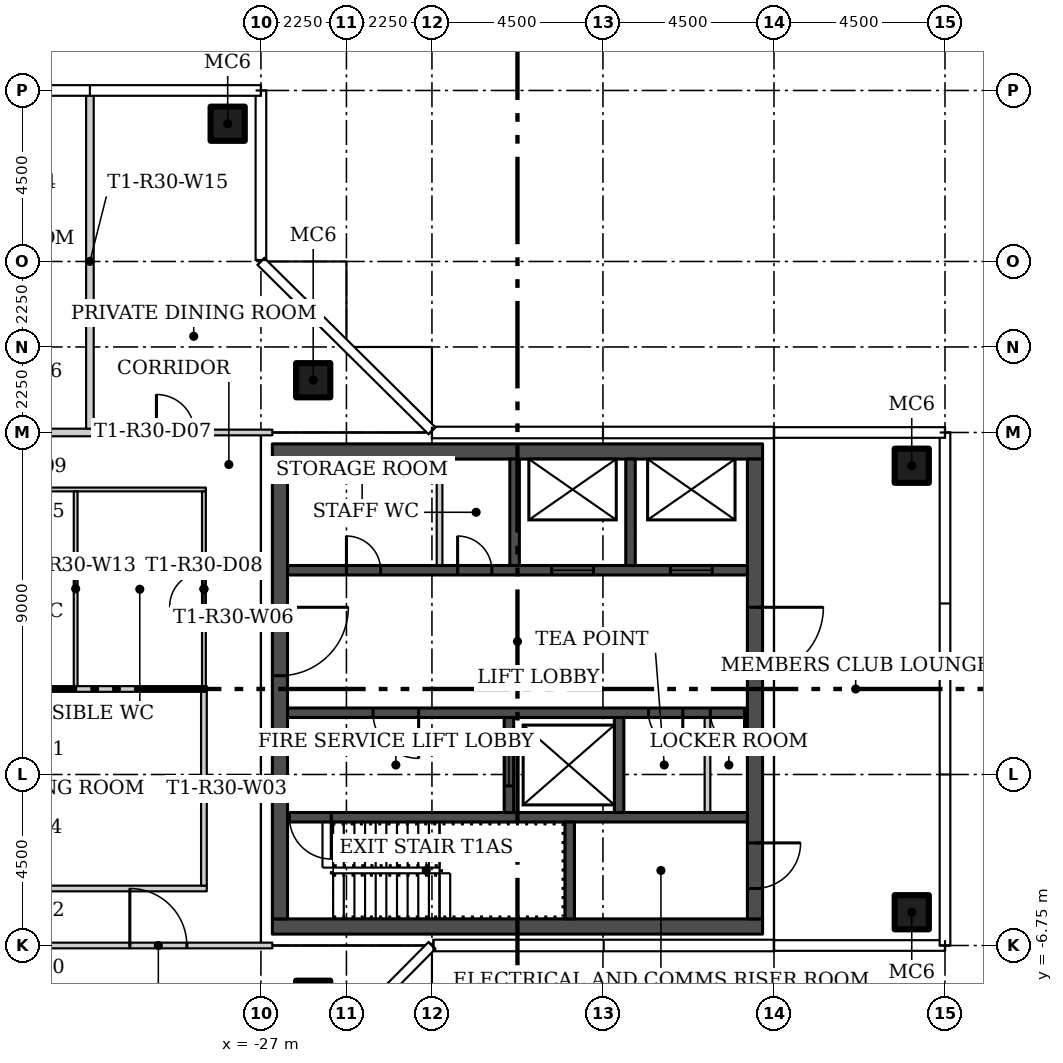
"""IFC4 building model, lengths in metres.
Left out: names, types, materials, properties, quantities, classifications, styles, units other than length and angle.
Written with IfcOpenShell. Run it as: python <this file> out.ifc"""

import sys

from ifc_helpers import new_model, si_unit, direction, frame, frame_2d, origin, origin_2d, place, context, subcontext, project, spatial, rectangle, hollow_rectangle, extrude, element, fill, save


model = new_model("IFC4")
c1 = context("Model", 3, precision=1e-05, world=origin(), true_north=direction((0.0, 1.0)))
c2 = subcontext(c1, "Body", "Model", "MODEL_VIEW")
j1 = project(units=[si_unit("LENGTHUNIT", "METRE"), si_unit("PLANEANGLEUNIT", "RADIAN")], contexts=[c1])
p1 = place(None, origin())
s1 = spatial("IfcSite", under=j1, at=p1, CompositionType="ELEMENT")
p2 = place(p1, origin())
s2 = spatial("IfcBuilding", under=s1, at=p2, CompositionType="ELEMENT")
p3 = place(p2, frame((0.0, 0.0, 269.4)))
s3 = spatial("IfcBuildingStorey", under=s2, at=p3, CompositionType="ELEMENT", Elevation=269.4)
for number, where in (
    (1, (-25.625, 8.125, 0.0)),
    (2, (-25.625, -8.125, 0.0)),
    (3, (-9.875, -5.875, 0.0)),
    (4, (-9.875, 5.875, 0.0)),
    (5, (-27.875, 14.875, 0.0)),
):
    element("IfcColumn", number, at=place(p3, frame(where)), inside=s3, PredefinedType="COLUMN", context=c2, shape_type="SweptSolid", body=[
        extrude(hollow_rectangle(XDim=0.9, YDim=0.9, WallThickness=0.036, at=origin_2d()), origin(), (0.0, 0.0, 1.0), 3.45),
    ])
p4 = place(p3, frame((-39.075, -5.25, 0.0)))
e6 = element("IfcWall", 6, at=p4, inside=s3, PredefinedType="PARTITIONING", context=c2, shape_type="SweptSolid", body=[
    extrude(rectangle(XDim=10.65, YDim=0.15, at=frame_2d((5.325, 0.0))), origin(), (0.0, 0.0, 1.0), 3.45),
])
p5 = place(p4, frame((4.575, 0.0, 0.0)))
e7 = element("IfcOpeningElement", 7, at=p5, cuts=e6, PredefinedType="OPENING", context=c2, shape_type="SweptSolid", body=[
    extrude(rectangle(XDim=1.5, YDim=2.1, at=frame_2d((0.75, 1.05))), frame((0.0, 0.085, 0.0), z_axis=(0.0, -1.0, 0.0), x_axis=(1.0, 0.0, 0.0)), (0.0, 0.0, 1.0), 0.17),
])
p6 = place(p3, frame((-28.5, -5.175, 0.0), z_axis=(0.0, 0.0, 1.0), x_axis=(0.0, 1.0, 0.0)))
e8 = element("IfcWall", 8, at=p6, inside=s3, PredefinedType="PARTITIONING", context=c2, shape_type="SweptSolid", body=[
    extrude(rectangle(XDim=5.1, YDim=0.15, at=frame_2d((2.55, 0.0))), origin(), (0.0, 0.0, 1.0), 3.45),
])
p7 = place(p3, frame((-28.45, 5.25, 0.0), z_axis=(0.0, 0.0, 1.0), x_axis=(-1.0, 0.0, 0.0)))
e9 = element("IfcWall", 9, at=p7, inside=s3, PredefinedType="PARTITIONING", context=c2, shape_type="SweptSolid", body=[
    extrude(rectangle(XDim=10.6, YDim=0.1, at=frame_2d((5.3, 0.0))), origin(), (0.0, 0.0, 1.0), 3.45),
])
p8 = place(p7, frame((4.756, 0.0, 0.0)))
e10 = element("IfcOpeningElement", 10, at=p8, cuts=e9, PredefinedType="OPENING", context=c2, shape_type="SweptSolid", body=[
    extrude(rectangle(XDim=0.9, YDim=2.1, at=frame_2d((0.45, 1.05))), frame((0.0, 0.06, 0.0), z_axis=(0.0, -1.0, 0.0), x_axis=(1.0, 0.0, 0.0)), (0.0, 0.0, 1.0), 0.12),
])
p9 = place(p3, frame((-28.5, 0.075, 0.0), z_axis=(0.0, 0.0, 1.0), x_axis=(0.0, 1.0, 0.0)))
e11 = element("IfcWall", 11, at=p9, inside=s3, PredefinedType="PARTITIONING", context=c2, shape_type="SweptSolid", body=[
    extrude(rectangle(XDim=5.125, YDim=0.1, at=frame_2d((2.562, 0.0))), origin(), (0.0, 0.0, 1.0), 3.45),
])
p10 = place(p9, frame((2.1, 0.0, 0.0)))
e12 = element("IfcOpeningElement", 12, at=p10, cuts=e11, PredefinedType="OPENING", context=c2, shape_type="SweptSolid", body=[
    extrude(rectangle(XDim=0.9, YDim=2.1, at=frame_2d((0.45, 1.05))), frame((0.0, 0.06, 0.0), z_axis=(0.0, -1.0, 0.0), x_axis=(1.0, 0.0, 0.0)), (0.0, 0.0, 1.0), 0.12),
])
p11 = place(p3, frame((-31.6, 6.75, 0.0)))
e13 = element("IfcWall", 13, at=p11, inside=s3, PredefinedType="PARTITIONING", context=c2, shape_type="SweptSolid", body=[
    extrude(rectangle(XDim=4.9, YDim=0.15, at=frame_2d((2.45, 0.0))), origin(), (0.0, 0.0, 1.0), 3.45),
])
p12 = place(p11, frame((1.85, 0.0, 0.0)))
e14 = element("IfcOpeningElement", 14, at=p12, cuts=e13, PredefinedType="OPENING", context=c2, shape_type="SweptSolid", body=[
    extrude(rectangle(XDim=1.0, YDim=2.4, at=frame_2d((0.5, 1.2))), frame((0.0, 0.085, 0.0), z_axis=(0.0, -1.0, 0.0), x_axis=(1.0, 0.0, 0.0)), (0.0, 0.0, 1.0), 0.17),
])
p13 = place(p3, frame((-36.1, 6.75, 0.0)))
e15 = element("IfcWall", 15, at=p13, inside=s3, PredefinedType="PARTITIONING", context=c2, shape_type="SweptSolid", body=[
    extrude(rectangle(XDim=4.7, YDim=0.2, at=frame_2d((2.35, 0.0))), origin(), (0.0, 0.0, 1.0), 3.45),
])
p14 = place(p13, frame((1.6, 0.0, 0.0)))
e16 = element("IfcOpeningElement", 16, at=p14, cuts=e15, PredefinedType="OPENING", context=c2, shape_type="SweptSolid", body=[
    extrude(rectangle(XDim=1.5, YDim=2.4, at=frame_2d((0.75, 1.2))), frame((0.0, 0.11, 0.0), z_axis=(0.0, -1.0, 0.0), x_axis=(1.0, 0.0, 0.0)), (0.0, 0.0, 1.0), 0.22),
])
p15 = place(p3, frame((-40.8, -6.75, 0.0)))
e17 = element("IfcWall", 17, at=p15, inside=s3, PredefinedType="PARTITIONING", context=c2, shape_type="SweptSolid", body=[
    extrude(rectangle(XDim=14.1, YDim=0.15, at=frame_2d((7.05, 0.0))), origin(), (0.0, 0.0, 1.0), 3.45),
])
p16 = place(p15, frame((2.25, 0.0, 0.0)))
e18 = element("IfcOpeningElement", 18, at=p16, cuts=e17, PredefinedType="OPENING", context=c2, shape_type="SweptSolid", body=[
    extrude(rectangle(XDim=1.5, YDim=2.1, at=frame_2d((0.75, 1.05))), frame((0.0, 0.085, 0.0), z_axis=(0.0, -1.0, 0.0), x_axis=(1.0, 0.0, 0.0)), (0.0, 0.0, 1.0), 0.17),
])
p17 = place(p15, frame((10.35, 0.0, 0.0)))
e19 = element("IfcOpeningElement", 19, at=p17, cuts=e17, PredefinedType="OPENING", context=c2, shape_type="SweptSolid", body=[
    extrude(rectangle(XDim=1.5, YDim=2.1, at=frame_2d((0.75, 1.05))), frame((0.0, 0.085, 0.0), z_axis=(0.0, -1.0, 0.0), x_axis=(1.0, 0.0, 0.0)), (0.0, 0.0, 1.0), 0.17),
])
p18 = place(p3, frame((-28.425, 0.0, 0.0), z_axis=(0.0, 0.0, 1.0), x_axis=(-1.0, 0.0, 0.0)))
e20 = element("IfcWall", 20, at=p18, inside=s3, PredefinedType="PARTITIONING", context=c2, shape_type="SweptSolid", body=[
    extrude(rectangle(XDim=10.65, YDim=0.15, at=frame_2d((5.325, 0.0))), origin(), (0.0, 0.0, 1.0), 3.45),
])
p19 = place(p3, frame((-31.875, 0.075, 0.0), z_axis=(0.0, 0.0, 1.0), x_axis=(0.0, 1.0, 0.0)))
e21 = element("IfcWall", 21, at=p19, inside=s3, PredefinedType="PARTITIONING", context=c2, shape_type="SweptSolid", body=[
    extrude(rectangle(XDim=5.125, YDim=0.1, at=frame_2d((2.562, 0.0))), origin(), (0.0, 0.0, 1.0), 3.45),
])
p20 = place(p3, frame((-31.5, 6.85, 0.0), z_axis=(0.0, 0.0, 1.0), x_axis=(0.0, 1.0, 0.0)))
e22 = element("IfcWall", 22, at=p20, inside=s3, PredefinedType="PARTITIONING", context=c2, shape_type="SweptSolid", body=[
    extrude(rectangle(XDim=8.805, YDim=0.2, at=frame_2d((4.402, 0.0))), origin(), (0.0, 0.0, 1.0), 3.45),
])
for number, where in (
    (23, (-26.7, -6.25, 0.0)),
    (24, (-26.7, 6.25, 0.0)),
):
    element("IfcWall", number, at=place(p3, frame(where)), inside=s3, PredefinedType="SHEAR", context=c2, shape_type="SweptSolid", body=[
        extrude(rectangle(XDim=12.9, YDim=0.4, at=frame_2d((6.45, 0.0))), origin(), (0.0, 0.0, 1.0), 3.45),
    ])
p21 = place(p3, frame((-26.5, 6.05, 0.0), z_axis=(0.0, 0.0, 1.0), x_axis=(0.0, -1.0, 0.0)))
e25 = element("IfcWall", 25, at=p21, inside=s3, PredefinedType="SHEAR", context=c2, shape_type="SweptSolid", body=[
    extrude(rectangle(XDim=12.1, YDim=0.4, at=frame_2d((6.05, 0.0))), origin(), (0.0, 0.0, 1.0), 3.45),
])
p22 = place(p21, frame((3.9, 0.0, 0.0)))
e26 = element("IfcOpeningElement", 26, at=p22, cuts=e25, PredefinedType="OPENING", context=c2, shape_type="SweptSolid", body=[
    extrude(rectangle(XDim=1.8, YDim=2.4, at=frame_2d((0.9, 1.2))), frame((0.0, 0.21, 0.0), z_axis=(0.0, -1.0, 0.0), x_axis=(1.0, 0.0, 0.0)), (0.0, 0.0, 1.0), 0.42),
])
p23 = place(p3, frame((-14.0, 6.05, 0.0), z_axis=(0.0, 0.0, 1.0), x_axis=(0.0, -1.0, 0.0)))
e27 = element("IfcWall", 27, at=p23, inside=s3, PredefinedType="SHEAR", context=c2, shape_type="SweptSolid", body=[
    extrude(rectangle(XDim=12.1, YDim=0.4, at=frame_2d((6.05, 0.0))), origin(), (0.0, 0.0, 1.0), 3.45),
])
p24 = place(p23, frame((10.1, 0.0, 0.0)))
e28 = element("IfcOpeningElement", 28, at=p24, cuts=e27, PredefinedType="OPENING", context=c2, shape_type="SweptSolid", body=[
    extrude(rectangle(XDim=1.2, YDim=2.1, at=frame_2d((0.6, 1.05))), frame((0.0, 0.21, 0.0), z_axis=(0.0, -1.0, 0.0), x_axis=(1.0, 0.0, 0.0)), (0.0, 0.0, 1.0), 0.42),
])
p25 = place(p23, frame((3.9, 0.0, 0.0)))
e29 = element("IfcOpeningElement", 29, at=p25, cuts=e27, PredefinedType="OPENING", context=c2, shape_type="SweptSolid", body=[
    extrude(rectangle(XDim=1.8, YDim=2.4, at=frame_2d((0.9, 1.2))), frame((0.0, 0.21, 0.0), z_axis=(0.0, -1.0, 0.0), x_axis=(1.0, 0.0, 0.0)), (0.0, 0.0, 1.0), 0.42),
])
p26 = place(p3, frame((-14.2, -3.375, 0.0), z_axis=(0.0, 0.0, 1.0), x_axis=(-1.0, 0.0, 0.0)))
e30 = element("IfcWall", 30, at=p26, inside=s3, PredefinedType="SHEAR", context=c2, shape_type="SweptSolid", body=[
    extrude(rectangle(XDim=12.1, YDim=0.25, at=frame_2d((6.05, 0.0))), origin(), (0.0, 0.0, 1.0), 3.45),
])
p27 = place(p26, frame((10.95, 0.0, 0.0)))
e31 = element("IfcOpeningElement", 31, at=p27, cuts=e30, PredefinedType="OPENING", context=c2, shape_type="SweptSolid", body=[
    extrude(rectangle(XDim=1.1, YDim=2.1, at=frame_2d((0.55, 1.05))), frame((0.0, 0.135, 0.0), z_axis=(0.0, -1.0, 0.0), x_axis=(1.0, 0.0, 0.0)), (0.0, 0.0, 1.0), 0.27),
])
p28 = place(p3, frame((-18.875, -6.05, 0.0), z_axis=(0.0, 0.0, 1.0), x_axis=(0.0, 1.0, 0.0)))
e32 = element("IfcWall", 32, at=p28, inside=s3, PredefinedType="SHEAR", context=c2, shape_type="SweptSolid", body=[
    extrude(rectangle(XDim=2.55, YDim=0.25, at=frame_2d((1.275, 0.0))), origin(), (0.0, 0.0, 1.0), 3.45),
])
p29 = place(p3, frame((-14.2, -0.625, 0.0), z_axis=(0.0, 0.0, 1.0), x_axis=(-1.0, 0.0, 0.0)))
e33 = element("IfcWall", 33, at=p29, inside=s3, PredefinedType="SHEAR", context=c2, shape_type="SweptSolid", body=[
    extrude(rectangle(XDim=12.1, YDim=0.25, at=frame_2d((6.05, 0.0))), origin(), (0.0, 0.0, 1.0), 3.45),
])
p30 = place(p29, frame((8.65, 0.0, 0.0)))
e34 = element("IfcOpeningElement", 34, at=p30, cuts=e33, PredefinedType="OPENING", context=c2, shape_type="SweptSolid", body=[
    extrude(rectangle(XDim=1.2, YDim=2.1, at=frame_2d((0.6, 1.05))), frame((0.0, 0.135, 0.0), z_axis=(0.0, -1.0, 0.0), x_axis=(1.0, 0.0, 0.0)), (0.0, 0.0, 1.0), 0.27),
])
p31 = place(p29, frame((1.7, 0.0, 0.0)))
e35 = element("IfcOpeningElement", 35, at=p31, cuts=e33, PredefinedType="OPENING", context=c2, shape_type="SweptSolid", body=[
    extrude(rectangle(XDim=0.9, YDim=2.1, at=frame_2d((0.45, 1.05))), frame((0.0, 0.135, 0.0), z_axis=(0.0, -1.0, 0.0), x_axis=(1.0, 0.0, 0.0)), (0.0, 0.0, 1.0), 0.27),
])
p32 = place(p29, frame((0.075, 0.0, 0.0)))
e36 = element("IfcOpeningElement", 36, at=p32, cuts=e33, PredefinedType="OPENING", context=c2, shape_type="SweptSolid", body=[
    extrude(rectangle(XDim=0.9, YDim=2.1, at=frame_2d((0.45, 1.05))), frame((0.0, 0.135, 0.0), z_axis=(0.0, -1.0, 0.0), x_axis=(1.0, 0.0, 0.0)), (0.0, 0.0, 1.0), 0.27),
])
p33 = place(p3, frame((-20.475, -3.25, 0.0), z_axis=(0.0, 0.0, 1.0), x_axis=(0.0, 1.0, 0.0)))
e37 = element("IfcWall", 37, at=p33, inside=s3, PredefinedType="SHEAR", context=c2, shape_type="SweptSolid", body=[
    extrude(rectangle(XDim=2.5, YDim=0.25, at=frame_2d((1.25, 0.0))), origin(), (0.0, 0.0, 1.0), 3.45),
])
p34 = place(p33, frame((0.7, 0.0, 0.0)))
e38 = element("IfcOpeningElement", 38, at=p34, cuts=e37, PredefinedType="OPENING", context=c2, shape_type="SweptSolid", body=[
    extrude(rectangle(XDim=1.1, YDim=2.1, at=frame_2d((0.55, 1.05))), frame((0.0, 0.135, 0.0), z_axis=(0.0, -1.0, 0.0), x_axis=(1.0, 0.0, 0.0)), (0.0, 0.0, 1.0), 0.27),
])
p35 = place(p3, frame((-17.575, -3.25, 0.0), z_axis=(0.0, 0.0, 1.0), x_axis=(0.0, 1.0, 0.0)))
e39 = element("IfcWall", 39, at=p35, inside=s3, PredefinedType="SHEAR", context=c2, shape_type="SweptSolid", body=[
    extrude(rectangle(XDim=2.5, YDim=0.25, at=frame_2d((1.25, 0.0))), origin(), (0.0, 0.0, 1.0), 3.45),
])
p36 = place(p3, frame((-15.25, -3.25, 0.0), z_axis=(0.0, 0.0, 1.0), x_axis=(0.0, 1.0, 0.0)))
e40 = element("IfcWall", 40, at=p36, inside=s3, PredefinedType="PARTITIONING", context=c2, shape_type="SweptSolid", body=[
    extrude(rectangle(XDim=2.5, YDim=0.15, at=frame_2d((1.25, 0.0))), origin(), (0.0, 0.0, 1.0), 3.45),
])
p37 = place(p3, frame((-26.3, 3.125, 0.0)))
e41 = element("IfcWall", 41, at=p37, inside=s3, PredefinedType="SHEAR", context=c2, shape_type="SweptSolid", body=[
    extrude(rectangle(XDim=12.1, YDim=0.25, at=frame_2d((6.05, 0.0))), origin(), (0.0, 0.0, 1.0), 3.45),
])
p38 = place(p37, frame((6.95, 0.0, 0.0)))
e42 = element("IfcOpeningElement", 42, at=p38, cuts=e41, PredefinedType="OPENING", context=c2, shape_type="SweptSolid", body=[
    extrude(rectangle(XDim=1.1, YDim=2.1, at=frame_2d((0.55, 1.05))), frame((0.0, 0.135, 0.0), z_axis=(0.0, -1.0, 0.0), x_axis=(1.0, 0.0, 0.0)), (0.0, 0.0, 1.0), 0.27),
])
p39 = place(p37, frame((10.075, 0.0, 0.0)))
e43 = element("IfcOpeningElement", 43, at=p39, cuts=e41, PredefinedType="OPENING", context=c2, shape_type="SweptSolid", body=[
    extrude(rectangle(XDim=1.1, YDim=2.1, at=frame_2d((0.55, 1.05))), frame((0.0, 0.135, 0.0), z_axis=(0.0, -1.0, 0.0), x_axis=(1.0, 0.0, 0.0)), (0.0, 0.0, 1.0), 0.27),
])
p40 = place(p37, frame((1.55, 0.0, 0.0)))
e44 = element("IfcOpeningElement", 44, at=p40, cuts=e41, PredefinedType="OPENING", context=c2, shape_type="SweptSolid", body=[
    extrude(rectangle(XDim=0.9, YDim=2.1, at=frame_2d((0.45, 1.05))), frame((0.0, 0.135, 0.0), z_axis=(0.0, -1.0, 0.0), x_axis=(1.0, 0.0, 0.0)), (0.0, 0.0, 1.0), 0.27),
])
p41 = place(p37, frame((4.475, 0.0, 0.0)))
e45 = element("IfcOpeningElement", 45, at=p41, cuts=e41, PredefinedType="OPENING", context=c2, shape_type="SweptSolid", body=[
    extrude(rectangle(XDim=0.9, YDim=2.1, at=frame_2d((0.45, 1.05))), frame((0.0, 0.135, 0.0), z_axis=(0.0, -1.0, 0.0), x_axis=(1.0, 0.0, 0.0)), (0.0, 0.0, 1.0), 0.27),
])
for number, where, z_axis, x_axis in (
    (46, (-20.325, 3.25, 0.0), (0.0, 0.0, 1.0), (0.0, 1.0, 0.0)),
    (47, (-17.275, 3.25, 0.0), (0.0, 0.0, 1.0), (0.0, 1.0, 0.0)),
):
    element("IfcWall", number, at=place(p3, frame(where, z_axis=z_axis, x_axis=x_axis)), inside=s3, PredefinedType="SHEAR", context=c2, shape_type="SweptSolid", body=[
        extrude(rectangle(XDim=2.8, YDim=0.25, at=frame_2d((1.4, 0.0))), origin(), (0.0, 0.0, 1.0), 3.45),
    ])
p42 = place(p3, frame((-22.3, 3.25, 0.0), z_axis=(0.0, 0.0, 1.0), x_axis=(0.0, 1.0, 0.0)))
e48 = element("IfcWall", 48, at=p42, inside=s3, PredefinedType="PARTITIONING", context=c2, shape_type="SweptSolid", body=[
    extrude(rectangle(XDim=2.8, YDim=0.15, at=frame_2d((1.4, 0.0))), origin(), (0.0, 0.0, 1.0), 3.45),
])
p43 = place(p17, origin())
e49 = element("IfcDoor", 49, at=p43, inside=s3, OperationType="DOUBLE_DOOR_SINGLE_SWING", PredefinedType="DOOR", context=c2, shape_type="SweptSolid", body=[
    extrude(rectangle(XDim=1.5, YDim=2.1, at=frame_2d((0.75, 1.05))), frame((0.0, 0.025, 0.0), z_axis=(0.0, -1.0, 0.0), x_axis=(1.0, 0.0, 0.0)), (0.0, 0.0, 1.0), 0.05),
])
fill(e19, e49)
p44 = place(p12, origin())
e50 = element("IfcDoor", 50, at=p44, inside=s3, OperationType="SINGLE_SWING_RIGHT", PredefinedType="DOOR", context=c2, shape_type="SweptSolid", body=[
    extrude(rectangle(XDim=1.0, YDim=2.4, at=frame_2d((0.5, 1.2))), frame((0.0, 0.025, 0.0), z_axis=(0.0, -1.0, 0.0), x_axis=(1.0, 0.0, 0.0)), (0.0, 0.0, 1.0), 0.05),
])
fill(e14, e50)
p45 = place(p10, origin())
e51 = element("IfcDoor", 51, at=p45, inside=s3, OperationType="SINGLE_SWING_RIGHT", PredefinedType="DOOR", context=c2, shape_type="SweptSolid", body=[
    extrude(rectangle(XDim=0.9, YDim=2.1, at=frame_2d((0.45, 1.05))), frame((0.0, 0.025, 0.0), z_axis=(0.0, -1.0, 0.0), x_axis=(1.0, 0.0, 0.0)), (0.0, 0.0, 1.0), 0.05),
])
fill(e12, e51)
p46 = place(p22, origin())
e52 = element("IfcDoor", 52, at=p46, inside=s3, OperationType="DOUBLE_DOOR_SINGLE_SWING", PredefinedType="DOOR", context=c2, shape_type="SweptSolid", body=[
    extrude(rectangle(XDim=1.8, YDim=2.4, at=frame_2d((0.9, 1.2))), frame((0.0, 0.025, 0.0), z_axis=(0.0, -1.0, 0.0), x_axis=(1.0, 0.0, 0.0)), (0.0, 0.0, 1.0), 0.05),
])
fill(e26, e52)
p47 = place(p24, origin())
e53 = element("IfcDoor", 53, at=p47, inside=s3, OperationType="SINGLE_SWING_RIGHT", PredefinedType="DOOR", context=c2, shape_type="SweptSolid", body=[
    extrude(rectangle(XDim=1.2, YDim=2.1, at=frame_2d((0.6, 1.05))), frame((0.0, 0.025, 0.0), z_axis=(0.0, -1.0, 0.0), x_axis=(1.0, 0.0, 0.0)), (0.0, 0.0, 1.0), 0.05),
])
fill(e28, e53)
p48 = place(p25, origin())
e54 = element("IfcDoor", 54, at=p48, inside=s3, OperationType="DOUBLE_DOOR_SINGLE_SWING", PredefinedType="DOOR", context=c2, shape_type="SweptSolid", body=[
    extrude(rectangle(XDim=1.8, YDim=2.4, at=frame_2d((0.9, 1.2))), frame((0.0, 0.025, 0.0), z_axis=(0.0, -1.0, 0.0), x_axis=(1.0, 0.0, 0.0)), (0.0, 0.0, 1.0), 0.05),
])
fill(e29, e54)
p49 = place(p27, origin())
e55 = element("IfcDoor", 55, at=p49, inside=s3, OperationType="SINGLE_SWING_RIGHT", PredefinedType="DOOR", context=c2, shape_type="SweptSolid", body=[
    extrude(rectangle(XDim=1.1, YDim=2.1, at=frame_2d((0.55, 1.05))), frame((0.0, 0.025, 0.0), z_axis=(0.0, -1.0, 0.0), x_axis=(1.0, 0.0, 0.0)), (0.0, 0.0, 1.0), 0.05),
])
fill(e31, e55)
p50 = place(p30, origin())
e56 = element("IfcDoor", 56, at=p50, inside=s3, OperationType="SINGLE_SWING_RIGHT", PredefinedType="DOOR", context=c2, shape_type="SweptSolid", body=[
    extrude(rectangle(XDim=1.2, YDim=2.1, at=frame_2d((0.6, 1.05))), frame((0.0, 0.025, 0.0), z_axis=(0.0, -1.0, 0.0), x_axis=(1.0, 0.0, 0.0)), (0.0, 0.0, 1.0), 0.05),
])
fill(e34, e56)
p51 = place(p31, origin())
e57 = element("IfcDoor", 57, at=p51, inside=s3, OperationType="SINGLE_SWING_LEFT", PredefinedType="DOOR", context=c2, shape_type="SweptSolid", body=[
    extrude(rectangle(XDim=0.9, YDim=2.1, at=frame_2d((0.45, 1.05))), frame((0.0, 0.025, 0.0), z_axis=(0.0, -1.0, 0.0), x_axis=(1.0, 0.0, 0.0)), (0.0, 0.0, 1.0), 0.05),
])
fill(e35, e57)
p52 = place(p32, origin())
e58 = element("IfcDoor", 58, at=p52, inside=s3, OperationType="SINGLE_SWING_LEFT", PredefinedType="DOOR", context=c2, shape_type="SweptSolid", body=[
    extrude(rectangle(XDim=0.9, YDim=2.1, at=frame_2d((0.45, 1.05))), frame((0.0, 0.025, 0.0), z_axis=(0.0, -1.0, 0.0), x_axis=(1.0, 0.0, 0.0)), (0.0, 0.0, 1.0), 0.05),
])
fill(e36, e58)
p53 = place(p34, origin())
e59 = element("IfcDoor", 59, at=p53, inside=s3, OperationType="SLIDING_TO_LEFT", PredefinedType="DOOR", context=c2, shape_type="SweptSolid", body=[
    extrude(rectangle(XDim=1.1, YDim=2.1, at=frame_2d((0.55, 1.05))), frame((0.0, 0.025, 0.0), z_axis=(0.0, -1.0, 0.0), x_axis=(1.0, 0.0, 0.0)), (0.0, 0.0, 1.0), 0.05),
])
fill(e38, e59)
p54 = place(p38, origin())
e60 = element("IfcDoor", 60, at=p54, inside=s3, OperationType="SLIDING_TO_LEFT", PredefinedType="DOOR", context=c2, shape_type="SweptSolid", body=[
    extrude(rectangle(XDim=1.1, YDim=2.1, at=frame_2d((0.55, 1.05))), frame((0.0, 0.025, 0.0), z_axis=(0.0, -1.0, 0.0), x_axis=(1.0, 0.0, 0.0)), (0.0, 0.0, 1.0), 0.05),
])
fill(e42, e60)
p55 = place(p39, origin())
e61 = element("IfcDoor", 61, at=p55, inside=s3, OperationType="SLIDING_TO_LEFT", PredefinedType="DOOR", context=c2, shape_type="SweptSolid", body=[
    extrude(rectangle(XDim=1.1, YDim=2.1, at=frame_2d((0.55, 1.05))), frame((0.0, 0.025, 0.0), z_axis=(0.0, -1.0, 0.0), x_axis=(1.0, 0.0, 0.0)), (0.0, 0.0, 1.0), 0.05),
])
fill(e43, e61)
p56 = place(p40, origin())
e62 = element("IfcDoor", 62, at=p56, inside=s3, OperationType="SINGLE_SWING_LEFT", PredefinedType="DOOR", context=c2, shape_type="SweptSolid", body=[
    extrude(rectangle(XDim=0.9, YDim=2.1, at=frame_2d((0.45, 1.05))), frame((0.0, 0.025, 0.0), z_axis=(0.0, -1.0, 0.0), x_axis=(1.0, 0.0, 0.0)), (0.0, 0.0, 1.0), 0.05),
])
fill(e44, e62)
p57 = place(p41, origin())
e63 = element("IfcDoor", 63, at=p57, inside=s3, OperationType="SINGLE_SWING_LEFT", PredefinedType="DOOR", context=c2, shape_type="SweptSolid", body=[
    extrude(rectangle(XDim=0.9, YDim=2.1, at=frame_2d((0.45, 1.05))), frame((0.0, 0.025, 0.0), z_axis=(0.0, -1.0, 0.0), x_axis=(1.0, 0.0, 0.0)), (0.0, 0.0, 1.0), 0.05),
])
fill(e45, e63)
save(model, sys.argv[1])
